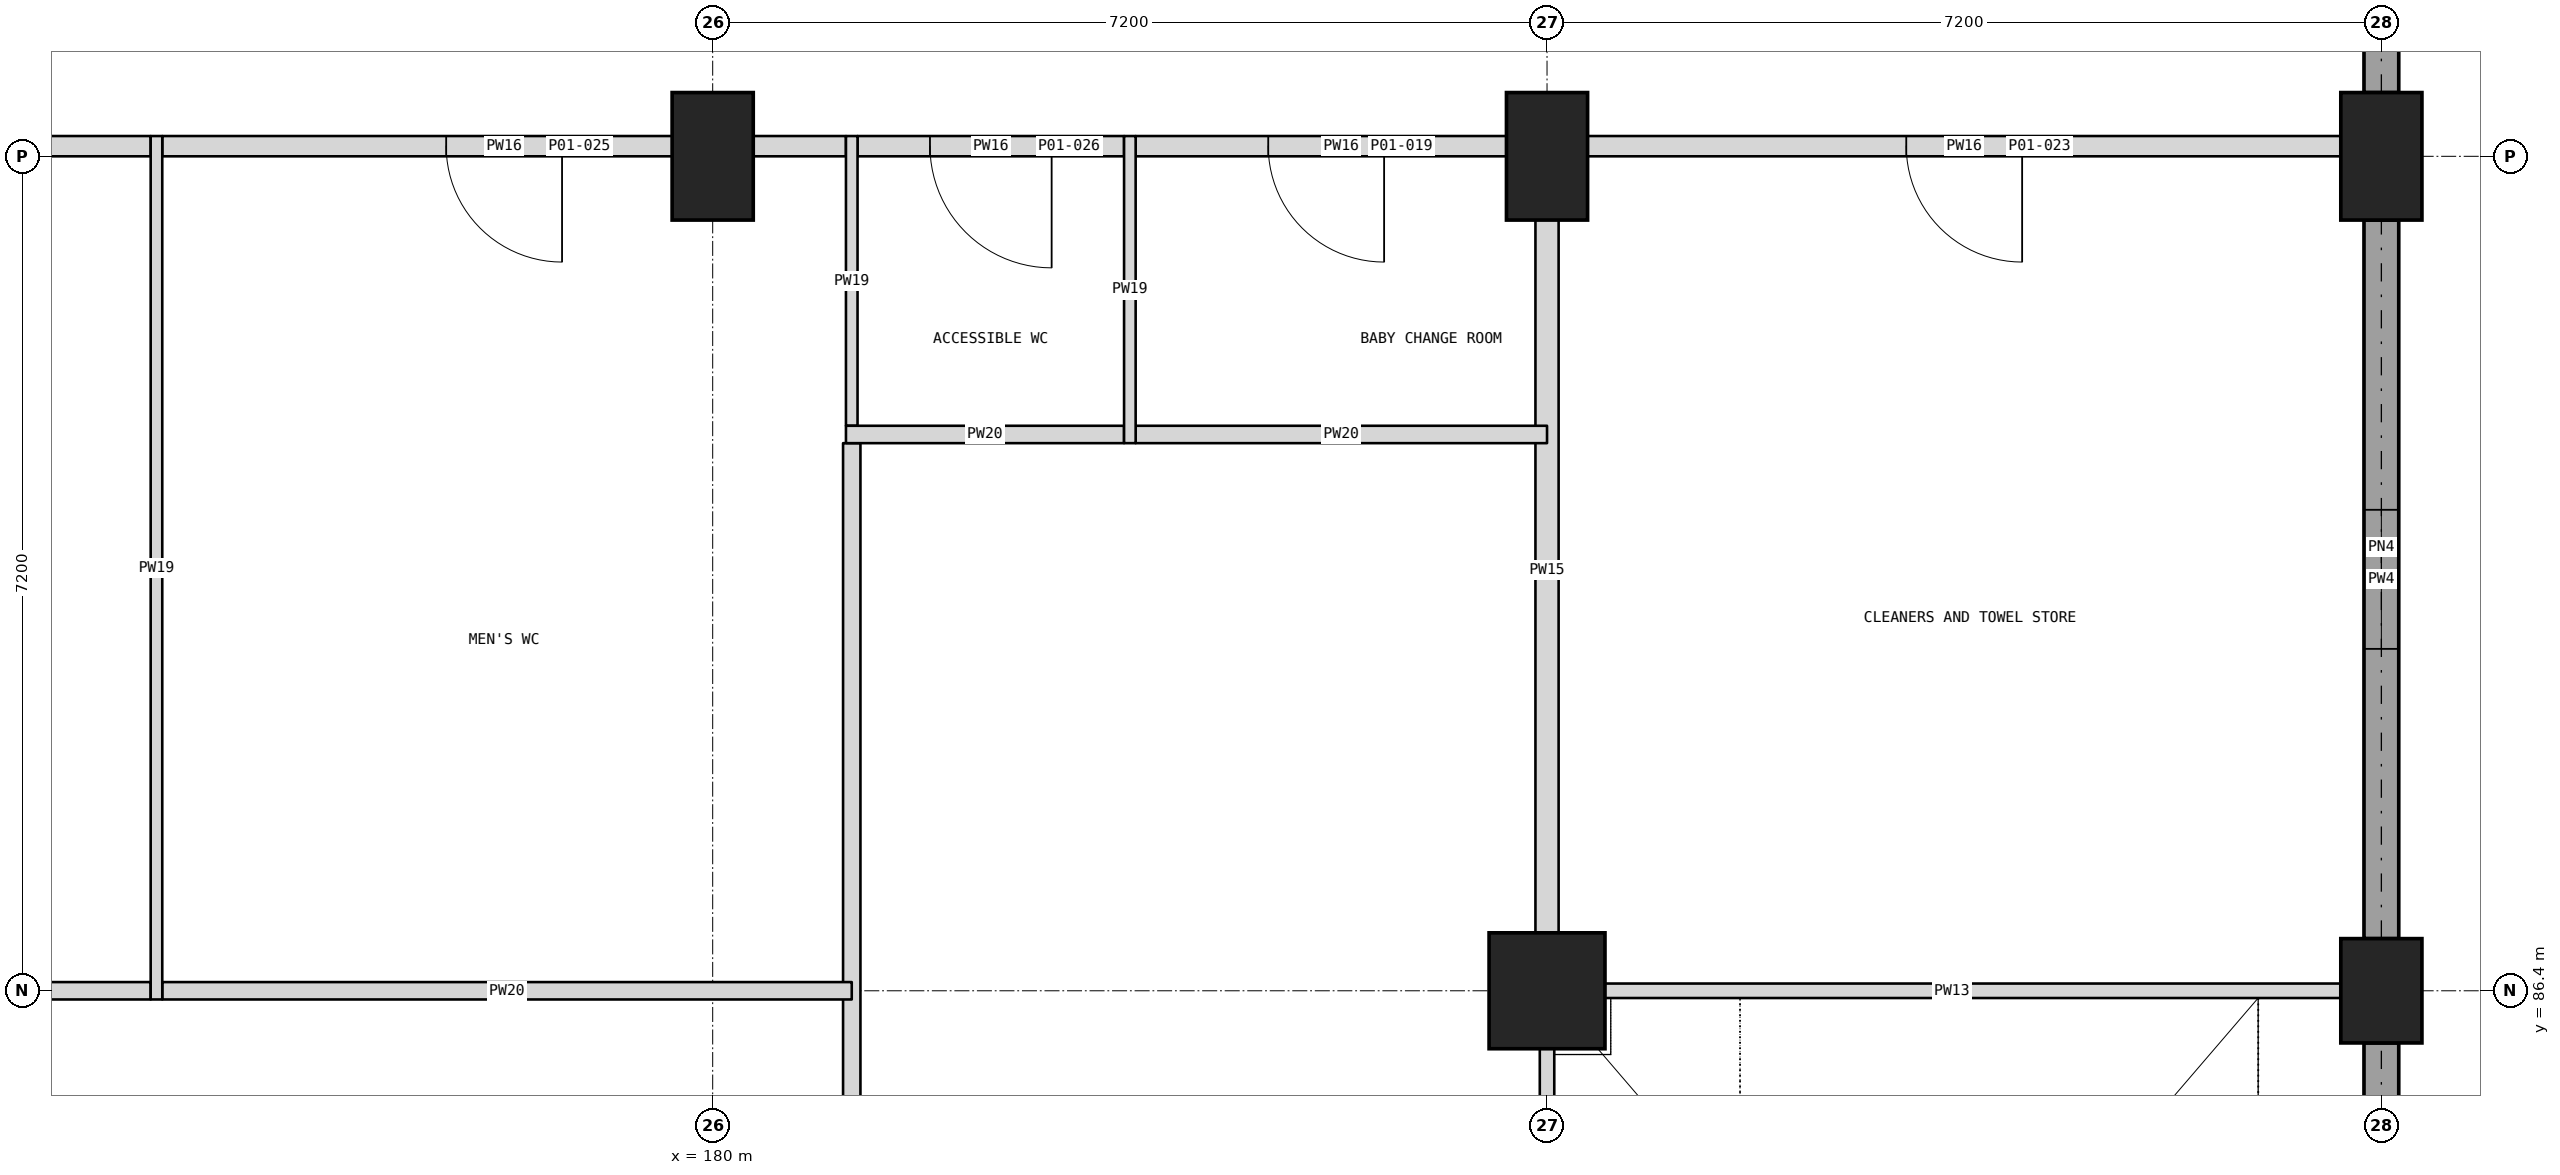
"""IFC4 building model, lengths in metres.
Left out: names, types, materials, properties, quantities, classifications, styles, units other than length and angle.
Written with IfcOpenShell. Run it as: python <this file> out.ifc"""

import sys

from ifc_helpers import new_model, si_unit, direction, frame, frame_2d, origin, origin_2d, place, context, subcontext, project, spatial, rectangle, extrude, element, fill, save


model = new_model("IFC4")
c1 = context("Model", 3, precision=1e-05, world=origin(), true_north=direction((0.0, 1.0)))
c2 = subcontext(c1, "Body", "Model", "MODEL_VIEW")
j1 = project(units=[si_unit("LENGTHUNIT", "METRE"), si_unit("PLANEANGLEUNIT", "RADIAN")], contexts=[c1])
p1 = place(None, origin())
s1 = spatial("IfcSite", under=j1, at=p1, CompositionType="ELEMENT")
p2 = place(p1, origin())
s2 = spatial("IfcBuilding", under=s1, at=p2, CompositionType="ELEMENT")
p3 = place(p2, frame((0.0, 0.0, 6.0)))
s3 = spatial("IfcBuildingStorey", under=s2, at=p3, CompositionType="ELEMENT", Elevation=6.0)
p4 = place(p3, frame((187.2, 86.4, 0.0), z_axis=(0.0, 0.0, 1.0), x_axis=(1.0, 0.0, 0.0)))
e1 = element("IfcColumn", 1, at=p4, inside=s3, PredefinedType="COLUMN", context=c2, shape_type="SweptSolid", body=[
    extrude(rectangle(XDim=1.0, YDim=1.0, at=origin_2d()), origin(), (0.0, 0.0, 1.0), 6.0),
])
p5 = place(p3, frame((194.4, 86.4, 0.0), z_axis=(0.0, 0.0, 1.0), x_axis=(1.0, 0.0, 0.0)))
e2 = element("IfcColumn", 2, at=p5, inside=s3, PredefinedType="COLUMN", context=c2, shape_type="SweptSolid", body=[
    extrude(rectangle(XDim=0.7, YDim=0.9, at=origin_2d()), origin(), (0.0, 0.0, 1.0), 6.0),
])
for number, where, z_axis, x_axis in (
    (3, (180.0, 93.6, 0.0), (0.0, 0.0, 1.0), (1.0, 0.0, 0.0)),
    (4, (187.2, 93.6, 0.0), (0.0, 0.0, 1.0), (1.0, 0.0, 0.0)),
    (5, (194.4, 93.6, 0.0), (0.0, 0.0, 1.0), (1.0, 0.0, 0.0)),
):
    element("IfcColumn", number, at=place(p3, frame(where, z_axis=z_axis, x_axis=x_axis)), inside=s3, PredefinedType="COLUMN", context=c2, shape_type="SweptSolid", body=[
        extrude(rectangle(XDim=0.7, YDim=1.1, at=origin_2d()), origin(), (0.0, 0.0, 1.0), 6.0),
    ])
p6 = place(p3, frame((194.4, 79.65, 0.0), z_axis=(0.0, 0.0, 1.0), x_axis=(0.0, 1.0, 0.0)))
e6 = element("IfcWall", 6, at=p6, inside=s3, PredefinedType="SOLIDWALL", context=c2, shape_type="SweptSolid", body=[
    extrude(rectangle(XDim=6.3, YDim=0.3, at=frame_2d((3.15, 0.0))), origin(), (0.0, 0.0, 1.0), 5.1),
])
p7 = place(p3, frame((194.4, 86.85, 0.0), z_axis=(0.0, 0.0, 1.0), x_axis=(0.0, 1.0, 0.0)))
e7 = element("IfcWall", 7, at=p7, inside=s3, PredefinedType="SOLIDWALL", context=c2, shape_type="SweptSolid", body=[
    extrude(rectangle(XDim=6.2, YDim=0.3, at=frame_2d((3.1, 0.0))), origin(), (0.0, 0.0, 1.0), 5.1),
])
p8 = place(p7, frame((2.5, 0.0, 0.9)))
e8 = element("IfcOpeningElement", 8, at=p8, cuts=e7, PredefinedType="OPENING", context=c2, shape_type="SweptSolid", body=[
    extrude(rectangle(XDim=1.2, YDim=1.2, at=frame_2d((0.6, 0.6))), frame((0.0, 0.16, 0.0), z_axis=(0.0, -1.0, 0.0), x_axis=(1.0, 0.0, 0.0)), (0.0, 0.0, 1.0), 0.32),
])
p9 = place(p3, frame((194.4, 94.15, 0.0), z_axis=(0.0, 0.0, 1.0), x_axis=(0.0, 1.0, 0.0)))
e9 = element("IfcWall", 9, at=p9, inside=s3, PredefinedType="SOLIDWALL", context=c2, shape_type="SweptSolid", body=[
    extrude(rectangle(XDim=6.1, YDim=0.3, at=frame_2d((3.05, 0.0))), origin(), (0.0, 0.0, 1.0), 5.1),
])
p10 = place(p9, frame((2.475, 0.0, 0.9)))
e10 = element("IfcOpeningElement", 10, at=p10, cuts=e9, PredefinedType="OPENING", context=c2, shape_type="SweptSolid", body=[
    extrude(rectangle(XDim=3.0, YDim=2.4, at=frame_2d((1.5, 1.2))), frame((0.0, 0.16, 0.0), z_axis=(0.0, -1.0, 0.0), x_axis=(1.0, 0.0, 0.0)), (0.0, 0.0, 1.0), 0.32),
])
p11 = place(p3, frame((187.2, 79.288, 0.0), z_axis=(0.0, 0.0, 1.0), x_axis=(0.0, 1.0, 0.0)))
e11 = element("IfcWall", 11, at=p11, inside=s3, PredefinedType="SOLIDWALL", context=c2, shape_type="SweptSolid", body=[
    extrude(rectangle(XDim=7.05, YDim=0.125, at=frame_2d((3.525, 0.0))), origin(), (0.0, 0.0, 1.0), 5.5),
])
p12 = place(p3, frame((187.2, 86.462, 0.0), z_axis=(0.0, 0.0, 1.0), x_axis=(0.0, 1.0, 0.0)))
e12 = element("IfcWall", 12, at=p12, inside=s3, PredefinedType="PARTITIONING", context=c2, shape_type="SweptSolid", body=[
    extrude(rectangle(XDim=7.138, YDim=0.2, at=frame_2d((3.569, 0.0))), origin(), (0.0, 0.0, 1.0), 5.5),
])
p13 = place(p3, frame((169.2, 93.688, 0.0), z_axis=(0.0, 0.0, 1.0), x_axis=(1.0, 0.0, 0.0)))
e13 = element("IfcWall", 13, at=p13, inside=s3, PredefinedType="PARTITIONING", context=c2, shape_type="SweptSolid", body=[
    extrude(rectangle(XDim=5.95, YDim=0.175, at=frame_2d((2.975, 0.0))), origin(), (0.0, 0.0, 1.0), 5.5),
])
p14 = place(p13, frame((2.1, 0.0, 0.0)))
e14 = element("IfcOpeningElement", 14, at=p14, cuts=e13, PredefinedType="OPENING", context=c2, shape_type="SweptSolid", body=[
    extrude(rectangle(XDim=1.0, YDim=2.1, at=frame_2d((0.5, 1.05))), frame((0.0, 0.097, 0.0), z_axis=(0.0, -1.0, 0.0), x_axis=(1.0, 0.0, 0.0)), (0.0, 0.0, 1.0), 0.195),
])
p15 = place(p3, frame((175.25, 93.688, 0.0), z_axis=(0.0, 0.0, 1.0), x_axis=(1.0, 0.0, 0.0)))
e15 = element("IfcWall", 15, at=p15, inside=s3, PredefinedType="PARTITIONING", context=c2, shape_type="SweptSolid", body=[
    extrude(rectangle(XDim=5.9, YDim=0.175, at=frame_2d((2.95, 0.0))), origin(), (0.0, 0.0, 1.0), 5.5),
])
p16 = place(p15, frame((2.45, 0.0, 0.0)))
e16 = element("IfcOpeningElement", 16, at=p16, cuts=e15, PredefinedType="OPENING", context=c2, shape_type="SweptSolid", body=[
    extrude(rectangle(XDim=1.0, YDim=2.1, at=frame_2d((0.5, 1.05))), frame((0.0, 0.097, 0.0), z_axis=(0.0, -1.0, 0.0), x_axis=(1.0, 0.0, 0.0)), (0.0, 0.0, 1.0), 0.195),
])
p17 = place(p3, frame((181.25, 93.688, 0.0), z_axis=(0.0, 0.0, 1.0), x_axis=(1.0, 0.0, 0.0)))
e17 = element("IfcWall", 17, at=p17, inside=s3, PredefinedType="PARTITIONING", context=c2, shape_type="SweptSolid", body=[
    extrude(rectangle(XDim=2.3, YDim=0.175, at=frame_2d((1.15, 0.0))), origin(), (0.0, 0.0, 1.0), 5.5),
])
p18 = place(p17, frame((0.625, 0.0, 0.0)))
e18 = element("IfcOpeningElement", 18, at=p18, cuts=e17, PredefinedType="OPENING", context=c2, shape_type="SweptSolid", body=[
    extrude(rectangle(XDim=1.05, YDim=2.1, at=frame_2d((0.525, 1.05))), frame((0.0, 0.097, 0.0), z_axis=(0.0, -1.0, 0.0), x_axis=(1.0, 0.0, 0.0)), (0.0, 0.0, 1.0), 0.195),
])
p19 = place(p3, frame((183.65, 93.688, 0.0), z_axis=(0.0, 0.0, 1.0), x_axis=(1.0, 0.0, 0.0)))
e19 = element("IfcWall", 19, at=p19, inside=s3, PredefinedType="PARTITIONING", context=c2, shape_type="SweptSolid", body=[
    extrude(rectangle(XDim=3.55, YDim=0.175, at=frame_2d((1.775, 0.0))), origin(), (0.0, 0.0, 1.0), 5.5),
])
p20 = place(p19, frame((1.144, 0.0, 0.0)))
e20 = element("IfcOpeningElement", 20, at=p20, cuts=e19, PredefinedType="OPENING", context=c2, shape_type="SweptSolid", body=[
    extrude(rectangle(XDim=1.0, YDim=2.1, at=frame_2d((0.5, 1.05))), frame((0.0, 0.097, 0.0), z_axis=(0.0, -1.0, 0.0), x_axis=(1.0, 0.0, 0.0)), (0.0, 0.0, 1.0), 0.195),
])
p21 = place(p3, frame((187.55, 93.688, 0.0), z_axis=(0.0, 0.0, 1.0), x_axis=(1.0, 0.0, 0.0)))
e21 = element("IfcWall", 21, at=p21, inside=s3, PredefinedType="PARTITIONING", context=c2, shape_type="SweptSolid", body=[
    extrude(rectangle(XDim=6.5, YDim=0.175, at=frame_2d((3.25, 0.0))), origin(), (0.0, 0.0, 1.0), 5.5),
])
p22 = place(p21, frame((2.75, 0.0, 0.0)))
e22 = element("IfcOpeningElement", 22, at=p22, cuts=e21, PredefinedType="OPENING", context=c2, shape_type="SweptSolid", body=[
    extrude(rectangle(XDim=1.0, YDim=2.2, at=frame_2d((0.5, 1.1))), frame((0.0, 0.097, 0.0), z_axis=(0.0, -1.0, 0.0), x_axis=(1.0, 0.0, 0.0)), (0.0, 0.0, 1.0), 0.195),
])
p23 = place(p3, frame((181.2, 79.288, 0.0), z_axis=(0.0, 0.0, 1.0), x_axis=(0.0, 1.0, 0.0)))
e23 = element("IfcWall", 23, at=p23, inside=s3, PredefinedType="PARTITIONING", context=c2, shape_type="SweptSolid", body=[
    extrude(rectangle(XDim=11.837, YDim=0.15, at=frame_2d((5.919, 0.0))), origin(), (0.0, 0.0, 1.0), 5.5),
])
p24 = place(p3, frame((181.2, 91.275, 0.0), z_axis=(0.0, 0.0, 1.0), x_axis=(0.0, 1.0, 0.0)))
e24 = element("IfcWall", 24, at=p24, inside=s3, PredefinedType="PARTITIONING", context=c2, shape_type="SweptSolid", body=[
    extrude(rectangle(XDim=2.5, YDim=0.1, at=frame_2d((1.25, 0.0))), origin(), (0.0, 0.0, 1.0), 5.5),
])
for number, where, z_axis, x_axis in (
    (25, (169.2, 86.4, 0.0), (0.0, 0.0, 1.0), (1.0, 0.0, 0.0)),
    (26, (175.25, 86.4, 0.0), (0.0, 0.0, 1.0), (1.0, 0.0, 0.0)),
):
    element("IfcWall", number, at=place(p3, frame(where, z_axis=z_axis, x_axis=x_axis)), inside=s3, PredefinedType="PARTITIONING", context=c2, shape_type="SweptSolid", body=[
        extrude(rectangle(XDim=5.95, YDim=0.15, at=frame_2d((2.975, 0.0))), origin(), (0.0, 0.0, 1.0), 5.5),
    ])
p25 = place(p3, frame((187.137, 86.4, 0.0), z_axis=(0.0, 0.0, 1.0), x_axis=(1.0, 0.0, 0.0)))
e27 = element("IfcWall", 27, at=p25, inside=s3, PredefinedType="SOLIDWALL", context=c2, shape_type="SweptSolid", body=[
    extrude(rectangle(XDim=7.113, YDim=0.125, at=frame_2d((3.556, 0.0))), origin(), (0.0, 0.0, 1.0), 5.5),
])
p26 = place(p3, frame((181.15, 91.2, 0.0), z_axis=(0.0, 0.0, 1.0), x_axis=(1.0, 0.0, 0.0)))
e28 = element("IfcWall", 28, at=p26, inside=s3, PredefinedType="PARTITIONING", context=c2, shape_type="SweptSolid", body=[
    extrude(rectangle(XDim=2.4, YDim=0.15, at=frame_2d((1.2, 0.0))), origin(), (0.0, 0.0, 1.0), 5.5),
])
p27 = place(p3, frame((183.65, 91.2, 0.0), z_axis=(0.0, 0.0, 1.0), x_axis=(1.0, 0.0, 0.0)))
e29 = element("IfcWall", 29, at=p27, inside=s3, PredefinedType="PARTITIONING", context=c2, shape_type="SweptSolid", body=[
    extrude(rectangle(XDim=3.55, YDim=0.15, at=frame_2d((1.775, 0.0))), origin(), (0.0, 0.0, 1.0), 5.5),
])
p28 = place(p3, frame((175.2, 86.325, 0.0), z_axis=(0.0, 0.0, 1.0), x_axis=(0.0, 1.0, 0.0)))
e30 = element("IfcWall", 30, at=p28, inside=s3, PredefinedType="PARTITIONING", context=c2, shape_type="SweptSolid", body=[
    extrude(rectangle(XDim=7.45, YDim=0.1, at=frame_2d((3.725, 0.0))), origin(), (0.0, 0.0, 1.0), 5.5),
])
p29 = place(p3, frame((183.6, 91.125, 0.0), z_axis=(0.0, 0.0, 1.0), x_axis=(0.0, 1.0, 0.0)))
e31 = element("IfcWall", 31, at=p29, inside=s3, PredefinedType="PARTITIONING", context=c2, shape_type="SweptSolid", body=[
    extrude(rectangle(XDim=2.65, YDim=0.1, at=frame_2d((1.325, 0.0))), origin(), (0.0, 0.0, 1.0), 5.5),
])
p30 = place(p8, origin())
e32 = element("IfcWindow", 32, at=p30, inside=s3, PartitioningType="SINGLE_PANEL", PredefinedType="WINDOW", context=c2, shape_type="SweptSolid", body=[
    extrude(rectangle(XDim=1.2, YDim=1.2, at=frame_2d((0.6, 0.6))), frame((0.0, 0.12, 0.0), z_axis=(0.0, -1.0, 0.0), x_axis=(1.0, 0.0, 0.0)), (0.0, 0.0, 1.0), 0.06),
])
fill(e8, e32)
p31 = place(p20, frame((1.0, 0.0, 0.0), z_axis=(0.0, 0.0, 1.0), x_axis=(-1.0, 0.0, 0.0)))
e33 = element("IfcDoor", 33, at=p31, inside=s3, OperationType="SINGLE_SWING_LEFT", PredefinedType="DOOR", context=c2, shape_type="SweptSolid", body=[
    extrude(rectangle(XDim=1.0, YDim=2.1, at=frame_2d((0.5, 1.05))), frame((0.0, 0.025, 0.0), z_axis=(0.0, -1.0, 0.0), x_axis=(1.0, 0.0, 0.0)), (0.0, 0.0, 1.0), 0.05),
])
fill(e20, e33)
p32 = place(p22, frame((1.0, 0.0, 0.0), z_axis=(0.0, 0.0, 1.0), x_axis=(-1.0, 0.0, 0.0)))
e34 = element("IfcDoor", 34, at=p32, inside=s3, OperationType="SINGLE_SWING_LEFT", PredefinedType="DOOR", context=c2, shape_type="SweptSolid", body=[
    extrude(rectangle(XDim=1.0, YDim=2.2, at=frame_2d((0.5, 1.1))), frame((0.0, 0.025, 0.0), z_axis=(0.0, -1.0, 0.0), x_axis=(1.0, 0.0, 0.0)), (0.0, 0.0, 1.0), 0.05),
])
fill(e22, e34)
p33 = place(p16, frame((1.0, 0.0, 0.0), z_axis=(0.0, 0.0, 1.0), x_axis=(-1.0, 0.0, 0.0)))
e35 = element("IfcDoor", 35, at=p33, inside=s3, OperationType="SINGLE_SWING_LEFT", PredefinedType="DOOR", context=c2, shape_type="SweptSolid", body=[
    extrude(rectangle(XDim=1.0, YDim=2.1, at=frame_2d((0.5, 1.05))), frame((0.0, 0.025, 0.0), z_axis=(0.0, -1.0, 0.0), x_axis=(1.0, 0.0, 0.0)), (0.0, 0.0, 1.0), 0.05),
])
fill(e16, e35)
p34 = place(p18, frame((1.05, 0.0, 0.0), z_axis=(0.0, 0.0, 1.0), x_axis=(-1.0, 0.0, 0.0)))
e36 = element("IfcDoor", 36, at=p34, inside=s3, OperationType="SINGLE_SWING_LEFT", PredefinedType="DOOR", context=c2, shape_type="SweptSolid", body=[
    extrude(rectangle(XDim=1.05, YDim=2.1, at=frame_2d((0.525, 1.05))), frame((0.0, 0.025, 0.0), z_axis=(0.0, -1.0, 0.0), x_axis=(1.0, 0.0, 0.0)), (0.0, 0.0, 1.0), 0.05),
])
fill(e18, e36)
save(model, sys.argv[1])
